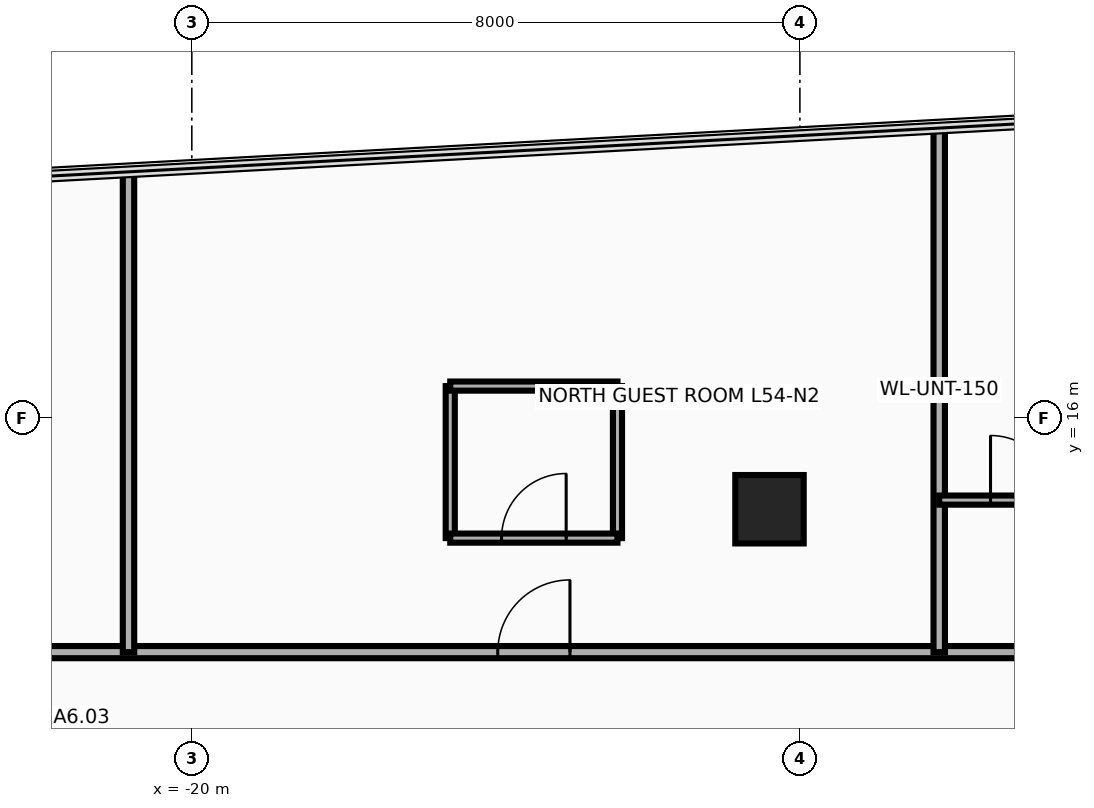
"""IFC4 building model, lengths in metres.
Left out: names, types, materials, properties, quantities, classifications, styles, units other than length and angle.
Written with IfcOpenShell. Run it as: python <this file> out.ifc"""

import sys

from ifc_helpers import new_model, si_unit, direction, frame, frame_2d, origin, origin_2d, place, context, subcontext, project, spatial, rectangle, extrude, source, transform, mapped, element, fill, save


model = new_model("IFC4")
c1 = context("Model", 3, precision=1e-05, world=origin(), true_north=direction((0.0, 1.0)))
c2 = subcontext(c1, "Body", "Model", "MODEL_VIEW")
j1 = project(units=[si_unit("LENGTHUNIT", "METRE"), si_unit("PLANEANGLEUNIT", "RADIAN")], contexts=[c1])
p1 = place(None, origin())
s1 = spatial("IfcSite", under=j1, at=p1, CompositionType="ELEMENT")
p2 = place(p1, origin())
s2 = spatial("IfcBuilding", under=s1, at=p2, CompositionType="ELEMENT")
p3 = place(p2, frame((0.0, 0.0, 212.5)))
s3 = spatial("IfcBuildingStorey", under=s2, at=p3, CompositionType="ELEMENT", Elevation=212.5)
m1 = source(origin(), c2, "Body", "SweptSolid", [
    extrude(rectangle(XDim=0.9, YDim=0.9, at=origin_2d()), origin(), (0.0, 0.0, 1.0), 3.5),
])
p4 = place(p3, frame((-12.4, 14.8, 0.0), z_axis=(0.0, 0.0, 1.0), x_axis=(1.0, 0.0, 0.0)))
e1 = element("IfcColumn", 1, at=p4, inside=s3, PredefinedType="COLUMN", context=c2, shape_type="MappedRepresentation", body=[
    mapped(m1, transform((0.0, 0.0, 0.0), x_axis=(1.0, 0.0, 0.0), y_axis=(0.0, 1.0, 0.0), z_axis=(0.0, 0.0, 1.0), scale=1.0)),
])
p5 = place(p3, frame((-30.89, 12.92, 0.0), z_axis=(0.0, 0.0, 1.0), x_axis=(1.0, 0.0, 0.0)))
e2 = element("IfcWall", 2, at=p5, inside=s3, PredefinedType="PARTITIONING", context=c2, shape_type="SweptSolid", body=[
    extrude(rectangle(XDim=31.28, YDim=0.16, at=frame_2d((15.64, 0.0))), origin(), (0.0, 0.0, 1.0), 2.634),
])
p6 = place(p5, frame((4.554, 0.0, 0.0)))
e3 = element("IfcOpeningElement", 3, at=p6, cuts=e2, PredefinedType="OPENING", context=c2, shape_type="SweptSolid", body=[
    extrude(rectangle(XDim=0.95, YDim=2.15, at=frame_2d((0.475, 1.075))), frame((0.0, 0.095, 0.0), z_axis=(0.0, -1.0, 0.0), x_axis=(1.0, 0.0, 0.0)), (0.0, 0.0, 1.0), 0.19),
])
p7 = place(p5, frame((14.915, 0.0, 0.0)))
e4 = element("IfcOpeningElement", 4, at=p7, cuts=e2, PredefinedType="OPENING", context=c2, shape_type="SweptSolid", body=[
    extrude(rectangle(XDim=0.95, YDim=2.15, at=frame_2d((0.475, 1.075))), frame((0.0, 0.095, 0.0), z_axis=(0.0, -1.0, 0.0), x_axis=(1.0, 0.0, 0.0)), (0.0, 0.0, 1.0), 0.19),
])
p8 = place(p5, frame((26.627, 0.0, 0.0)))
e5 = element("IfcOpeningElement", 5, at=p8, cuts=e2, PredefinedType="OPENING", context=c2, shape_type="SweptSolid", body=[
    extrude(rectangle(XDim=0.95, YDim=2.15, at=frame_2d((0.475, 1.075))), frame((0.0, 0.095, 0.0), z_axis=(0.0, -1.0, 0.0), x_axis=(1.0, 0.0, 0.0)), (0.0, 0.0, 1.0), 0.19),
])
p9 = place(p3, frame((-20.833, 12.92, 0.0), z_axis=(0.0, 0.0, 1.0), x_axis=(0.0, 1.0, 0.0)))
e6 = element("IfcWall", 6, at=p9, inside=s3, PredefinedType="PARTITIONING", context=c2, shape_type="SweptSolid", body=[
    extrude(rectangle(XDim=6.319, YDim=0.15, at=frame_2d((3.159, 0.0))), origin(), (0.0, 0.0, 1.0), 2.544),
])
p10 = place(p3, frame((-10.167, 12.92, 0.0), z_axis=(0.0, 0.0, 1.0), x_axis=(0.0, 1.0, 0.0)))
e7 = element("IfcWall", 7, at=p10, inside=s3, PredefinedType="PARTITIONING", context=c2, shape_type="SweptSolid", body=[
    extrude(rectangle(XDim=6.894, YDim=0.15, at=frame_2d((3.447, 0.0))), origin(), (0.0, 0.0, 1.0), 2.544),
])
for number, where, z_axis, x_axis in (
    (8, (-16.6, 14.42, 0.0), (0.0, 0.0, 1.0), (0.0, 1.0, 0.0)),
    (9, (-14.4, 14.42, 0.0), (0.0, 0.0, 1.0), (0.0, 1.0, 0.0)),
):
    element("IfcWall", number, at=place(p3, frame(where, z_axis=z_axis, x_axis=x_axis)), inside=s3, PredefinedType="PARTITIONING", context=c2, shape_type="SweptSolid", body=[
        extrude(rectangle(XDim=2.0, YDim=0.12, at=frame_2d((1.0, 0.0))), origin(), (0.0, 0.0, 1.0), 2.544),
    ])
p11 = place(p3, frame((-16.6, 16.42, 0.0), z_axis=(0.0, 0.0, 1.0), x_axis=(1.0, 0.0, 0.0)))
e10 = element("IfcWall", 10, at=p11, inside=s3, PredefinedType="PARTITIONING", context=c2, shape_type="SweptSolid", body=[
    extrude(rectangle(XDim=2.2, YDim=0.12, at=frame_2d((1.1, 0.0))), origin(), (0.0, 0.0, 1.0), 3.26),
])
p12 = place(p3, frame((-16.6, 14.42, 0.0), z_axis=(0.0, 0.0, 1.0), x_axis=(1.0, 0.0, 0.0)))
e11 = element("IfcWall", 11, at=p12, inside=s3, PredefinedType="PARTITIONING", context=c2, shape_type="SweptSolid", body=[
    extrude(rectangle(XDim=2.2, YDim=0.12, at=frame_2d((1.1, 0.0))), origin(), (0.0, 0.0, 1.0), 3.26),
])
p13 = place(p12, frame((0.675, 0.0, 0.0)))
e12 = element("IfcOpeningElement", 12, at=p13, cuts=e11, PredefinedType="OPENING", context=c2, shape_type="SweptSolid", body=[
    extrude(rectangle(XDim=0.85, YDim=2.1, at=frame_2d((0.425, 1.05))), frame((0.0, 0.075, 0.0), z_axis=(0.0, -1.0, 0.0), x_axis=(1.0, 0.0, 0.0)), (0.0, 0.0, 1.0), 0.15),
])
p14 = place(p3, frame((-10.167, 14.92, 0.0), z_axis=(0.0, 0.0, 1.0), x_axis=(1.0, 0.0, 0.0)))
e13 = element("IfcWall", 13, at=p14, inside=s3, PredefinedType="PARTITIONING", context=c2, shape_type="SweptSolid", body=[
    extrude(rectangle(XDim=2.2, YDim=0.12, at=frame_2d((1.1, 0.0))), origin(), (0.0, 0.0, 1.0), 2.544),
])
p15 = place(p14, frame((0.675, 0.0, 0.0)))
e14 = element("IfcOpeningElement", 14, at=p15, cuts=e13, PredefinedType="OPENING", context=c2, shape_type="SweptSolid", body=[
    extrude(rectangle(XDim=0.85, YDim=2.1, at=frame_2d((0.425, 1.05))), frame((0.0, 0.075, 0.0), z_axis=(0.0, -1.0, 0.0), x_axis=(1.0, 0.0, 0.0)), (0.0, 0.0, 1.0), 0.15),
])
p16 = place(p7, origin())
e15 = element("IfcDoor", 15, at=p16, inside=s3, OperationType="SINGLE_SWING_RIGHT", PredefinedType="DOOR", context=c2, shape_type="SweptSolid", body=[
    extrude(rectangle(XDim=0.95, YDim=2.15, at=frame_2d((0.475, 1.075))), frame((0.0, 0.025, 0.0), z_axis=(0.0, -1.0, 0.0), x_axis=(1.0, 0.0, 0.0)), (0.0, 0.0, 1.0), 0.05),
])
fill(e4, e15)
p17 = place(p13, origin())
e16 = element("IfcDoor", 16, at=p17, inside=s3, OperationType="SINGLE_SWING_LEFT", PredefinedType="DOOR", context=c2, shape_type="SweptSolid", body=[
    extrude(rectangle(XDim=0.85, YDim=2.1, at=frame_2d((0.425, 1.05))), frame((0.0, 0.025, 0.0), z_axis=(0.0, -1.0, 0.0), x_axis=(1.0, 0.0, 0.0)), (0.0, 0.0, 1.0), 0.05),
])
fill(e12, e16)
p18 = place(p15, origin())
e17 = element("IfcDoor", 17, at=p18, inside=s3, OperationType="SINGLE_SWING_LEFT", PredefinedType="DOOR", context=c2, shape_type="SweptSolid", body=[
    extrude(rectangle(XDim=0.85, YDim=2.1, at=frame_2d((0.425, 1.05))), frame((0.0, 0.025, 0.0), z_axis=(0.0, -1.0, 0.0), x_axis=(1.0, 0.0, 0.0)), (0.0, 0.0, 1.0), 0.05),
])
fill(e14, e17)
save(model, sys.argv[1])
